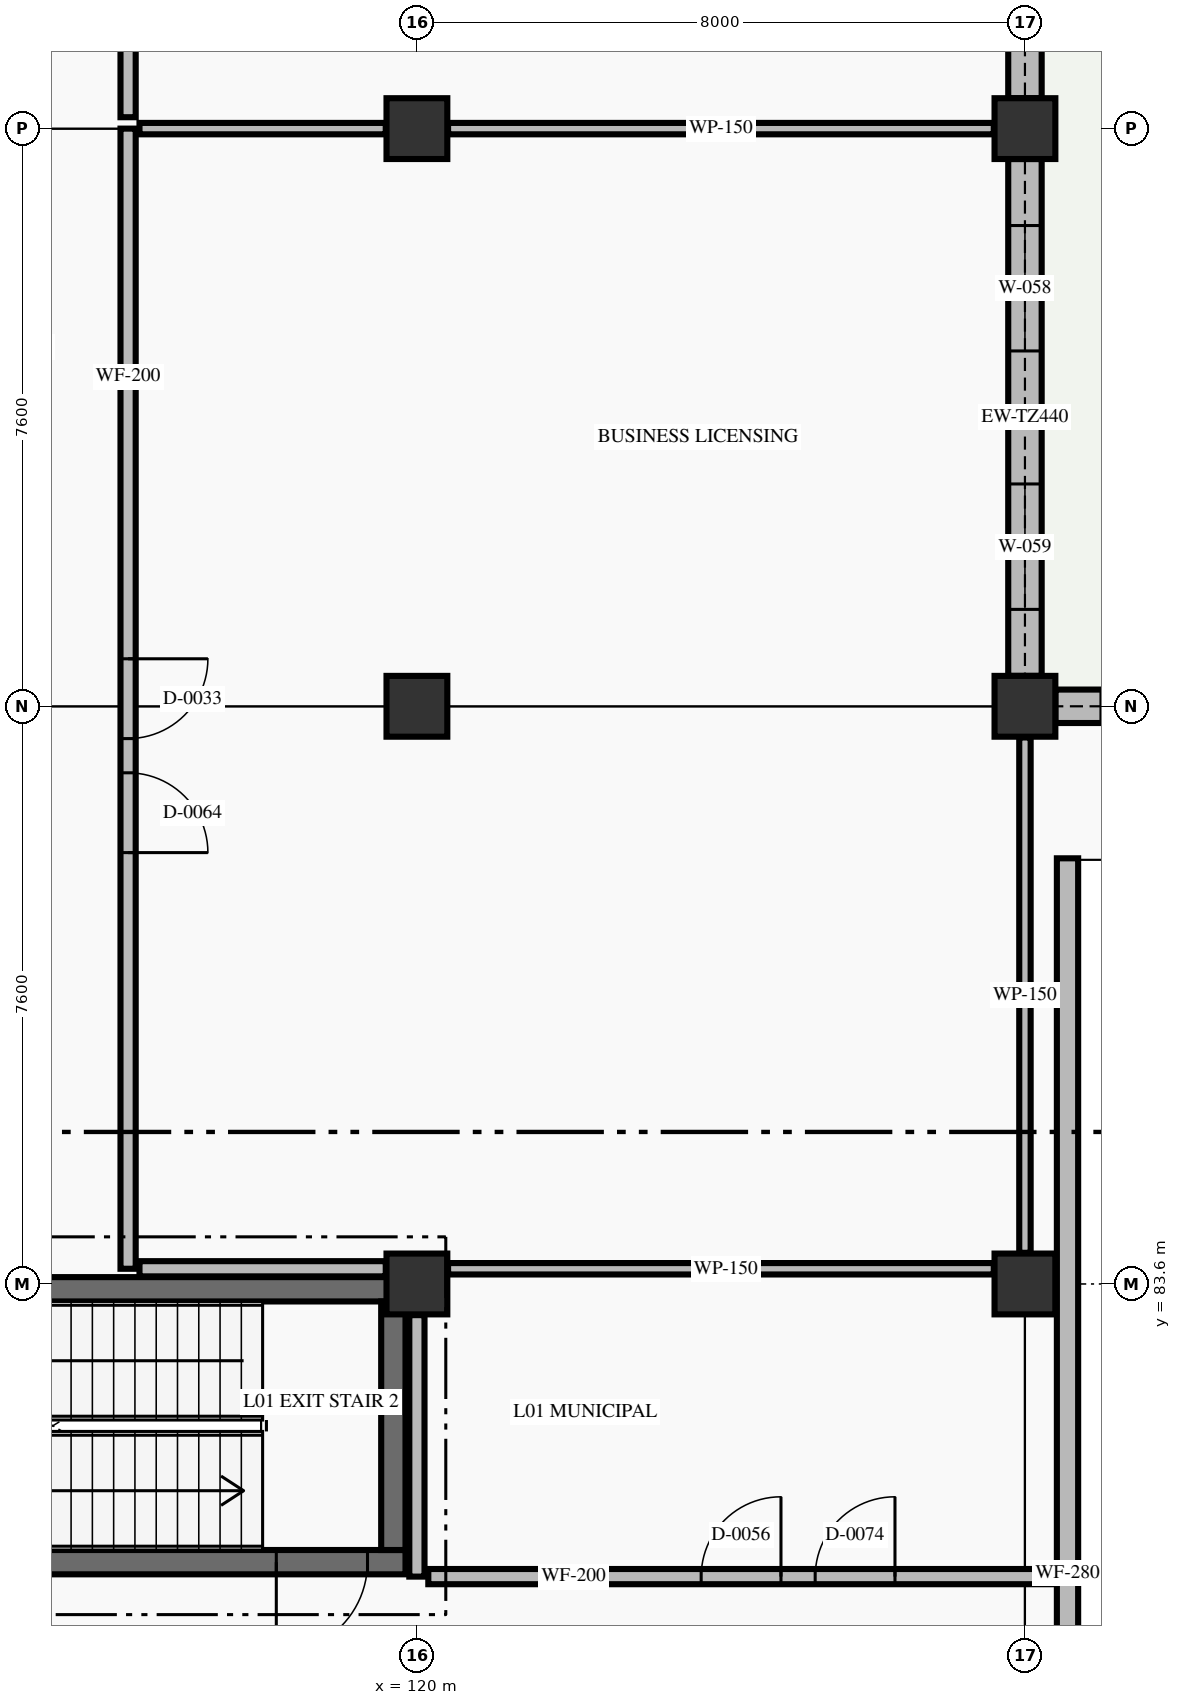
"""IFC4 building model, lengths in metres.
Left out: names, types, materials, properties, quantities, classifications, styles, units other than length and angle.
Written with IfcOpenShell. Run it as: python <this file> out.ifc"""

import sys

from ifc_helpers import new_model, si_unit, direction, frame, frame_2d, origin, origin_2d, place, context, subcontext, project, spatial, rectangle, extrude, element, fill, save


model = new_model("IFC4")
c1 = context("Model", 3, precision=1e-05, world=origin(), true_north=direction((0.0, 1.0)))
c2 = subcontext(c1, "Body", "Model", "MODEL_VIEW")
j1 = project(units=[si_unit("LENGTHUNIT", "METRE"), si_unit("PLANEANGLEUNIT", "RADIAN")], contexts=[c1])
p1 = place(None, origin())
s1 = spatial("IfcSite", under=j1, at=p1, CompositionType="ELEMENT")
p2 = place(p1, origin())
s2 = spatial("IfcBuilding", under=s1, at=p2, CompositionType="ELEMENT")
p3 = place(p2, origin())
s3 = spatial("IfcBuildingStorey", under=s2, at=p3, CompositionType="ELEMENT", Elevation=0.0)
for number, where, z_axis, x_axis in (
    (1, (120.0, 83.6, 0.0), (0.0, 0.0, 1.0), (1.0, 0.0, 0.0)),
    (2, (120.0, 91.2, 0.0), (0.0, 0.0, 1.0), (1.0, 0.0, 0.0)),
    (3, (120.0, 98.8, 0.0), (0.0, 0.0, 1.0), (1.0, 0.0, 0.0)),
    (4, (128.0, 83.6, 0.0), (0.0, 0.0, 1.0), (1.0, 0.0, 0.0)),
    (5, (128.0, 91.2, 0.0), (0.0, 0.0, 1.0), (1.0, 0.0, 0.0)),
    (6, (128.0, 98.8, 0.0), (0.0, 0.0, 1.0), (1.0, 0.0, 0.0)),
):
    element("IfcColumn", number, at=place(p3, frame(where, z_axis=z_axis, x_axis=x_axis)), inside=s3, PredefinedType="COLUMN", context=c2, shape_type="SweptSolid", body=[
        extrude(rectangle(XDim=0.8, YDim=0.8, at=origin_2d()), origin(), (0.0, 0.0, 1.0), 5.4),
    ])
p4 = place(p3, frame((128.0, 106.0, 0.0), z_axis=(0.0, 0.0, 1.0), x_axis=(0.0, -1.0, 0.0)))
e7 = element("IfcWall", 7, at=p4, inside=s3, PredefinedType="STANDARD", context=c2, shape_type="SweptSolid", body=[
    extrude(rectangle(XDim=6.8, YDim=0.44, at=frame_2d((3.4, 0.0))), origin(), (0.0, 0.0, 1.0), 4.46),
])
p5 = place(p4, frame((0.875, 0.0, 0.9)))
e8 = element("IfcOpeningElement", 8, at=p5, cuts=e7, PredefinedType="OPENING", context=c2, shape_type="SweptSolid", body=[
    extrude(rectangle(XDim=1.65, YDim=2.6, at=frame_2d((0.825, 1.3))), frame((0.0, 0.23, 0.0), z_axis=(0.0, -1.0, 0.0), x_axis=(1.0, 0.0, 0.0)), (0.0, 0.0, 1.0), 0.46),
])
p6 = place(p4, frame((4.275, 0.0, 0.9)))
e9 = element("IfcOpeningElement", 9, at=p6, cuts=e7, PredefinedType="OPENING", context=c2, shape_type="SweptSolid", body=[
    extrude(rectangle(XDim=1.65, YDim=2.6, at=frame_2d((0.825, 1.3))), frame((0.0, 0.23, 0.0), z_axis=(0.0, -1.0, 0.0), x_axis=(1.0, 0.0, 0.0)), (0.0, 0.0, 1.0), 0.46),
])
p7 = place(p3, frame((128.0, 98.4, 0.0), z_axis=(0.0, 0.0, 1.0), x_axis=(0.0, -1.0, 0.0)))
e10 = element("IfcWall", 10, at=p7, inside=s3, PredefinedType="STANDARD", context=c2, shape_type="SweptSolid", body=[
    extrude(rectangle(XDim=6.8, YDim=0.44, at=frame_2d((3.4, 0.0))), origin(), (0.0, 0.0, 1.0), 4.46),
])
p8 = place(p7, frame((0.875, 0.0, 0.9)))
e11 = element("IfcOpeningElement", 11, at=p8, cuts=e10, PredefinedType="OPENING", context=c2, shape_type="SweptSolid", body=[
    extrude(rectangle(XDim=1.65, YDim=2.6, at=frame_2d((0.825, 1.3))), frame((0.0, 0.23, 0.0), z_axis=(0.0, -1.0, 0.0), x_axis=(1.0, 0.0, 0.0)), (0.0, 0.0, 1.0), 0.46),
])
p9 = place(p7, frame((4.275, 0.0, 0.9)))
e12 = element("IfcOpeningElement", 12, at=p9, cuts=e10, PredefinedType="OPENING", context=c2, shape_type="SweptSolid", body=[
    extrude(rectangle(XDim=1.65, YDim=2.6, at=frame_2d((0.825, 1.3))), frame((0.0, 0.23, 0.0), z_axis=(0.0, -1.0, 0.0), x_axis=(1.0, 0.0, 0.0)), (0.0, 0.0, 1.0), 0.46),
])
p10 = place(p3, frame((128.4, 91.2, 0.0), z_axis=(0.0, 0.0, 1.0), x_axis=(1.0, 0.0, 0.0)))
e13 = element("IfcWall", 13, at=p10, inside=s3, PredefinedType="STANDARD", context=c2, shape_type="SweptSolid", body=[
    extrude(rectangle(XDim=7.2, YDim=0.44, at=frame_2d((3.6, 0.0))), origin(), (0.0, 0.0, 1.0), 4.51),
])
p11 = place(p10, frame((0.6, 0.0, 0.0)))
e14 = element("IfcOpeningElement", 14, at=p11, cuts=e13, PredefinedType="OPENING", context=c2, shape_type="SweptSolid", body=[
    extrude(rectangle(XDim=6.0, YDim=3.4, at=frame_2d((3.0, 1.7))), frame((0.0, 0.23, 0.0), z_axis=(0.0, -1.0, 0.0), x_axis=(1.0, 0.0, 0.0)), (0.0, 0.0, 1.0), 0.46),
])
p12 = place(p3, frame((119.85, 79.94, 0.0), z_axis=(0.0, 0.0, 1.0), x_axis=(-1.0, 0.0, 0.0)))
e15 = element("IfcWall", 15, at=p12, inside=s3, PredefinedType="SHEAR", context=c2, shape_type="SweptSolid", body=[
    extrude(rectangle(XDim=7.7, YDim=0.32, at=frame_2d((3.85, 0.0))), origin(), (0.0, 0.0, 1.0), 5.4),
])
p13 = place(p12, frame((0.5, 0.0, 0.0)))
e16 = element("IfcOpeningElement", 16, at=p13, cuts=e15, PredefinedType="OPENING", context=c2, shape_type="SweptSolid", body=[
    extrude(rectangle(XDim=1.2, YDim=2.2, at=frame_2d((0.6, 1.1))), frame((0.0, 0.17, 0.0), z_axis=(0.0, -1.0, 0.0), x_axis=(1.0, 0.0, 0.0)), (0.0, 0.0, 1.0), 0.34),
])
p14 = place(p3, frame((112.15, 83.53, 0.0), z_axis=(0.0, 0.0, 1.0), x_axis=(1.0, 0.0, 0.0)))
e17 = element("IfcWall", 17, at=p14, inside=s3, PredefinedType="SHEAR", context=c2, shape_type="SweptSolid", body=[
    extrude(rectangle(XDim=7.7, YDim=0.32, at=frame_2d((3.85, 0.0))), origin(), (0.0, 0.0, 1.0), 5.4),
])
p15 = place(p3, frame((119.69, 83.37, 0.0), z_axis=(0.0, 0.0, 1.0), x_axis=(0.0, -1.0, 0.0)))
e18 = element("IfcWall", 18, at=p15, inside=s3, PredefinedType="SHEAR", context=c2, shape_type="SweptSolid", body=[
    extrude(rectangle(XDim=3.27, YDim=0.32, at=frame_2d((1.635, 0.0))), origin(), (0.0, 0.0, 1.0), 5.4),
])
p16 = place(p3, frame((128.56, 53.2, 0.0), z_axis=(0.0, 0.0, 1.0), x_axis=(0.0, 1.0, 0.0)))
e19 = element("IfcWall", 19, at=p16, inside=s3, PredefinedType="STANDARD", context=c2, shape_type="SweptSolid", body=[
    extrude(rectangle(XDim=36.0, YDim=0.28, at=frame_2d((18.0, 0.0))), origin(), (0.0, 0.0, 1.0), 5.16),
])
p17 = place(p3, frame((116.2, 98.8, 0.0), z_axis=(0.0, 0.0, 1.0), x_axis=(0.0, -1.0, 0.0)))
e20 = element("IfcWall", 20, at=p17, inside=s3, PredefinedType="STANDARD", context=c2, shape_type="SweptSolid", body=[
    extrude(rectangle(XDim=15.0, YDim=0.2, at=frame_2d((7.5, 0.0))), origin(), (0.0, 0.0, 1.0), 4.66),
])
p18 = place(p17, frame((6.975, 0.0, 0.0)))
e21 = element("IfcOpeningElement", 21, at=p18, cuts=e20, PredefinedType="OPENING", context=c2, shape_type="SweptSolid", body=[
    extrude(rectangle(XDim=1.05, YDim=2.15, at=frame_2d((0.525, 1.075))), frame((0.0, 0.11, 0.0), z_axis=(0.0, -1.0, 0.0), x_axis=(1.0, 0.0, 0.0)), (0.0, 0.0, 1.0), 0.22),
])
p19 = place(p17, frame((8.475, 0.0, 0.0)))
e22 = element("IfcOpeningElement", 22, at=p19, cuts=e20, PredefinedType="OPENING", context=c2, shape_type="SweptSolid", body=[
    extrude(rectangle(XDim=1.05, YDim=2.15, at=frame_2d((0.525, 1.075))), frame((0.0, 0.11, 0.0), z_axis=(0.0, -1.0, 0.0), x_axis=(1.0, 0.0, 0.0)), (0.0, 0.0, 1.0), 0.22),
])
p20 = place(p3, frame((116.2, 113.84, 0.0), z_axis=(0.0, 0.0, 1.0), x_axis=(0.0, -1.0, 0.0)))
e23 = element("IfcWall", 23, at=p20, inside=s3, PredefinedType="STANDARD", context=c2, shape_type="SweptSolid", body=[
    extrude(rectangle(XDim=14.89, YDim=0.2, at=frame_2d((7.445, 0.0))), origin(), (0.0, 0.0, 1.0), 4.66),
])
p21 = place(p20, frame((6.92, 0.0, 0.0)))
e24 = element("IfcOpeningElement", 24, at=p21, cuts=e23, PredefinedType="OPENING", context=c2, shape_type="SweptSolid", body=[
    extrude(rectangle(XDim=1.05, YDim=2.15, at=frame_2d((0.525, 1.075))), frame((0.0, 0.11, 0.0), z_axis=(0.0, -1.0, 0.0), x_axis=(1.0, 0.0, 0.0)), (0.0, 0.0, 1.0), 0.22),
])
p22 = place(p3, frame((116.35, 83.8, 0.0), z_axis=(0.0, 0.0, 1.0), x_axis=(1.0, 0.0, 0.0)))
e25 = element("IfcWall", 25, at=p22, inside=s3, PredefinedType="STANDARD", context=c2, shape_type="SweptSolid", body=[
    extrude(rectangle(XDim=3.24, YDim=0.2, at=frame_2d((1.62, 0.0))), origin(), (0.0, 0.0, 1.0), 4.51),
])
p23 = place(p3, frame((120.0, 83.19, 0.0), z_axis=(0.0, 0.0, 1.0), x_axis=(0.0, -1.0, 0.0)))
e26 = element("IfcWall", 26, at=p23, inside=s3, PredefinedType="STANDARD", context=c2, shape_type="SweptSolid", body=[
    extrude(rectangle(XDim=3.44, YDim=0.2, at=frame_2d((1.72, 0.0))), origin(), (0.0, 0.0, 1.0), 4.46),
])
p24 = place(p3, frame((116.35, 98.8, 0.0), z_axis=(0.0, 0.0, 1.0), x_axis=(1.0, 0.0, 0.0)))
e27 = element("IfcWall", 27, at=p24, inside=s3, PredefinedType="PARTITIONING", context=c2, shape_type="SweptSolid", body=[
    extrude(rectangle(XDim=3.24, YDim=0.15, at=frame_2d((1.62, 0.0))), origin(), (0.0, 0.0, 1.0), 4.56),
])
p25 = place(p3, frame((120.41, 98.8, 0.0), z_axis=(0.0, 0.0, 1.0), x_axis=(1.0, 0.0, 0.0)))
e28 = element("IfcWall", 28, at=p25, inside=s3, PredefinedType="PARTITIONING", context=c2, shape_type="SweptSolid", body=[
    extrude(rectangle(XDim=7.18, YDim=0.15, at=frame_2d((3.59, 0.0))), origin(), (0.0, 0.0, 1.0), 4.56),
])
p26 = place(p3, frame((128.0, 90.79, 0.0), z_axis=(0.0, 0.0, 1.0), x_axis=(0.0, -1.0, 0.0)))
e29 = element("IfcWall", 29, at=p26, inside=s3, PredefinedType="PARTITIONING", context=c2, shape_type="SweptSolid", body=[
    extrude(rectangle(XDim=6.78, YDim=0.15, at=frame_2d((3.39, 0.0))), origin(), (0.0, 0.0, 1.0), 4.46),
])
p27 = place(p3, frame((127.59, 83.8, 0.0), z_axis=(0.0, 0.0, 1.0), x_axis=(-1.0, 0.0, 0.0)))
e30 = element("IfcWall", 30, at=p27, inside=s3, PredefinedType="PARTITIONING", context=c2, shape_type="SweptSolid", body=[
    extrude(rectangle(XDim=7.18, YDim=0.15, at=frame_2d((3.59, 0.0))), origin(), (0.0, 0.0, 1.0), 4.51),
])
p28 = place(p3, frame((120.15, 79.75, 0.0), z_axis=(0.0, 0.0, 1.0), x_axis=(1.0, 0.0, 0.0)))
e31 = element("IfcWall", 31, at=p28, inside=s3, PredefinedType="STANDARD", context=c2, shape_type="SweptSolid", body=[
    extrude(rectangle(XDim=8.23, YDim=0.2, at=frame_2d((4.115, 0.0))), origin(), (0.0, 0.0, 1.0), 5.16),
])
p29 = place(p28, frame((3.59, 0.0, 0.0)))
e32 = element("IfcOpeningElement", 32, at=p29, cuts=e31, PredefinedType="OPENING", context=c2, shape_type="SweptSolid", body=[
    extrude(rectangle(XDim=1.05, YDim=2.15, at=frame_2d((0.525, 1.075))), frame((0.0, 0.11, 0.0), z_axis=(0.0, -1.0, 0.0), x_axis=(1.0, 0.0, 0.0)), (0.0, 0.0, 1.0), 0.22),
])
p30 = place(p28, frame((5.09, 0.0, 0.0)))
e33 = element("IfcOpeningElement", 33, at=p30, cuts=e31, PredefinedType="OPENING", context=c2, shape_type="SweptSolid", body=[
    extrude(rectangle(XDim=1.05, YDim=2.15, at=frame_2d((0.525, 1.075))), frame((0.0, 0.11, 0.0), z_axis=(0.0, -1.0, 0.0), x_axis=(1.0, 0.0, 0.0)), (0.0, 0.0, 1.0), 0.22),
])
p31 = place(p8, origin())
e34 = element("IfcWindow", 34, at=p31, inside=s3, PartitioningType="DOUBLE_PANEL_VERTICAL", PredefinedType="WINDOW", context=c2, shape_type="SweptSolid", body=[
    extrude(rectangle(XDim=1.65, YDim=2.6, at=frame_2d((0.825, 1.3))), frame((0.0, 0.03, 0.0), z_axis=(0.0, -1.0, 0.0), x_axis=(1.0, 0.0, 0.0)), (0.0, 0.0, 1.0), 0.06),
])
fill(e11, e34)
p32 = place(p9, origin())
e35 = element("IfcWindow", 35, at=p32, inside=s3, PartitioningType="DOUBLE_PANEL_VERTICAL", PredefinedType="WINDOW", context=c2, shape_type="SweptSolid", body=[
    extrude(rectangle(XDim=1.65, YDim=2.6, at=frame_2d((0.825, 1.3))), frame((0.0, 0.03, 0.0), z_axis=(0.0, -1.0, 0.0), x_axis=(1.0, 0.0, 0.0)), (0.0, 0.0, 1.0), 0.06),
])
fill(e12, e35)
p33 = place(p13, origin())
e36 = element("IfcDoor", 36, at=p33, inside=s3, OperationType="SINGLE_SWING_RIGHT", PredefinedType="DOOR", context=c2, shape_type="SweptSolid", body=[
    extrude(rectangle(XDim=1.2, YDim=2.2, at=frame_2d((0.6, 1.1))), frame((0.0, 0.025, 0.0), z_axis=(0.0, -1.0, 0.0), x_axis=(1.0, 0.0, 0.0)), (0.0, 0.0, 1.0), 0.05),
])
fill(e16, e36)
p34 = place(p18, origin())
e37 = element("IfcDoor", 37, at=p34, inside=s3, OperationType="SINGLE_SWING_LEFT", PredefinedType="DOOR", context=c2, shape_type="SweptSolid", body=[
    extrude(rectangle(XDim=1.05, YDim=2.15, at=frame_2d((0.525, 1.075))), frame((0.0, 0.025, 0.0), z_axis=(0.0, -1.0, 0.0), x_axis=(1.0, 0.0, 0.0)), (0.0, 0.0, 1.0), 0.05),
])
fill(e21, e37)
p35 = place(p29, origin())
e38 = element("IfcDoor", 38, at=p35, inside=s3, OperationType="SINGLE_SWING_RIGHT", PredefinedType="DOOR", context=c2, shape_type="SweptSolid", body=[
    extrude(rectangle(XDim=1.05, YDim=2.15, at=frame_2d((0.525, 1.075))), frame((0.0, 0.025, 0.0), z_axis=(0.0, -1.0, 0.0), x_axis=(1.0, 0.0, 0.0)), (0.0, 0.0, 1.0), 0.05),
])
fill(e32, e38)
p36 = place(p19, origin())
e39 = element("IfcDoor", 39, at=p36, inside=s3, OperationType="SINGLE_SWING_RIGHT", PredefinedType="DOOR", context=c2, shape_type="SweptSolid", body=[
    extrude(rectangle(XDim=1.05, YDim=2.15, at=frame_2d((0.525, 1.075))), frame((0.0, 0.025, 0.0), z_axis=(0.0, -1.0, 0.0), x_axis=(1.0, 0.0, 0.0)), (0.0, 0.0, 1.0), 0.05),
])
fill(e22, e39)
p37 = place(p30, origin())
e40 = element("IfcDoor", 40, at=p37, inside=s3, OperationType="SINGLE_SWING_RIGHT", PredefinedType="DOOR", context=c2, shape_type="SweptSolid", body=[
    extrude(rectangle(XDim=1.05, YDim=2.15, at=frame_2d((0.525, 1.075))), frame((0.0, 0.025, 0.0), z_axis=(0.0, -1.0, 0.0), x_axis=(1.0, 0.0, 0.0)), (0.0, 0.0, 1.0), 0.05),
])
fill(e33, e40)
save(model, sys.argv[1])
